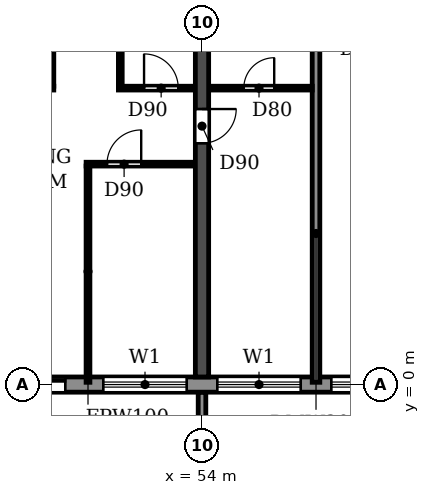
"""IFC4 building model, lengths in metres.
Left out: names, types, materials, properties, quantities, classifications, styles, units other than length and angle.
Written with IfcOpenShell. Run it as: python <this file> out.ifc"""

import sys

from ifc_helpers import new_model, si_unit, direction, frame, frame_2d, origin, place, context, subcontext, project, spatial, polyline, rectangle, outline, extrude, source, transform, mapped, element, fill, save


model = new_model("IFC4")
c1 = context("Model", 3, precision=1e-05, world=origin(), true_north=direction((0.0, 1.0)))
c2 = subcontext(c1, "Body", "Model", "MODEL_VIEW")
j1 = project(units=[si_unit("LENGTHUNIT", "METRE"), si_unit("PLANEANGLEUNIT", "RADIAN")], contexts=[c1])
p1 = place(None, origin())
s1 = spatial("IfcSite", under=j1, at=p1, CompositionType="ELEMENT")
p2 = place(p1, origin())
s2 = spatial("IfcBuilding", under=s1, at=p2, CompositionType="ELEMENT")
p3 = place(p2, frame((0.0, 0.0, 92.7)))
s3 = spatial("IfcBuildingStorey", under=s2, at=p3, CompositionType="ELEMENT", Elevation=92.7)
p4 = place(p3, frame((54.0, 0.2, 0.0), z_axis=(0.0, 0.0, 1.0), x_axis=(0.0, 1.0, 0.0)))
e1 = element("IfcWall", 1, at=p4, inside=s3, PredefinedType="SHEAR", context=c2, shape_type="SweptSolid", body=[
    extrude(rectangle(XDim=11.675, YDim=0.35, at=frame_2d((5.837, 0.0))), origin(), (0.0, 0.0, 1.0), 3.06),
])
p5 = place(p4, frame((6.15, 0.0, 0.0)))
e2 = element("IfcOpeningElement", 2, at=p5, cuts=e1, PredefinedType="OPENING", context=c2, shape_type="SweptSolid", body=[
    extrude(rectangle(XDim=0.9, YDim=2.1, at=frame_2d((0.45, 1.05))), frame((0.0, 0.185, 0.0), z_axis=(0.0, -1.0, 0.0), x_axis=(1.0, 0.0, 0.0)), (0.0, 0.0, 1.0), 0.37),
])
p6 = place(p3, frame((10.683, 0.0, 0.0), z_axis=(0.0, 0.0, 1.0), x_axis=(1.0, 0.0, 0.0)))
e3 = element("IfcWall", 3, at=p6, inside=s3, PredefinedType="STANDARD", context=c2, shape_type="SweptSolid", body=[
    extrude(rectangle(XDim=80.634, YDim=0.4, at=frame_2d((40.317, 0.0))), origin(), (0.0, 0.0, 1.0), 3.06),
])
p7 = place(p6, frame((1.717, 0.0, 0.9)))
e4 = element("IfcOpeningElement", 4, at=p7, cuts=e3, PredefinedType="OPENING", context=c2, shape_type="SweptSolid", body=[
    extrude(rectangle(XDim=2.2, YDim=1.5, at=frame_2d((1.1, 0.75))), frame((0.0, 0.21, 0.0), z_axis=(0.0, -1.0, 0.0), x_axis=(1.0, 0.0, 0.0)), (0.0, 0.0, 1.0), 0.42),
])
p8 = place(p6, frame((4.917, 0.0, 0.0)))
e5 = element("IfcOpeningElement", 5, at=p8, cuts=e3, PredefinedType="OPENING", context=c2, shape_type="SweptSolid", body=[
    extrude(rectangle(XDim=1.8, YDim=2.4, at=frame_2d((0.9, 1.2))), frame((0.0, 0.21, 0.0), z_axis=(0.0, -1.0, 0.0), x_axis=(1.0, 0.0, 0.0)), (0.0, 0.0, 1.0), 0.42),
])
p9 = place(p6, frame((7.717, 0.0, 0.9)))
e6 = element("IfcOpeningElement", 6, at=p9, cuts=e3, PredefinedType="OPENING", context=c2, shape_type="SweptSolid", body=[
    extrude(rectangle(XDim=2.2, YDim=1.5, at=frame_2d((1.1, 0.75))), frame((0.0, 0.21, 0.0), z_axis=(0.0, -1.0, 0.0), x_axis=(1.0, 0.0, 0.0)), (0.0, 0.0, 1.0), 0.42),
])
p10 = place(p6, frame((10.717, 0.0, 0.9)))
e7 = element("IfcOpeningElement", 7, at=p10, cuts=e3, PredefinedType="OPENING", context=c2, shape_type="SweptSolid", body=[
    extrude(rectangle(XDim=2.2, YDim=1.5, at=frame_2d((1.1, 0.75))), frame((0.0, 0.21, 0.0), z_axis=(0.0, -1.0, 0.0), x_axis=(1.0, 0.0, 0.0)), (0.0, 0.0, 1.0), 0.42),
])
p11 = place(p6, frame((13.717, 0.0, 0.9)))
e8 = element("IfcOpeningElement", 8, at=p11, cuts=e3, PredefinedType="OPENING", context=c2, shape_type="SweptSolid", body=[
    extrude(rectangle(XDim=2.2, YDim=1.5, at=frame_2d((1.1, 0.75))), frame((0.0, 0.21, 0.0), z_axis=(0.0, -1.0, 0.0), x_axis=(1.0, 0.0, 0.0)), (0.0, 0.0, 1.0), 0.42),
])
p12 = place(p6, frame((16.717, 0.0, 0.9)))
e9 = element("IfcOpeningElement", 9, at=p12, cuts=e3, PredefinedType="OPENING", context=c2, shape_type="SweptSolid", body=[
    extrude(rectangle(XDim=2.2, YDim=1.5, at=frame_2d((1.1, 0.75))), frame((0.0, 0.21, 0.0), z_axis=(0.0, -1.0, 0.0), x_axis=(1.0, 0.0, 0.0)), (0.0, 0.0, 1.0), 0.42),
])
p13 = place(p6, frame((19.717, 0.0, 0.9)))
e10 = element("IfcOpeningElement", 10, at=p13, cuts=e3, PredefinedType="OPENING", context=c2, shape_type="SweptSolid", body=[
    extrude(rectangle(XDim=2.2, YDim=1.5, at=frame_2d((1.1, 0.75))), frame((0.0, 0.21, 0.0), z_axis=(0.0, -1.0, 0.0), x_axis=(1.0, 0.0, 0.0)), (0.0, 0.0, 1.0), 0.42),
])
p14 = place(p6, frame((22.717, 0.0, 0.9)))
e11 = element("IfcOpeningElement", 11, at=p14, cuts=e3, PredefinedType="OPENING", context=c2, shape_type="SweptSolid", body=[
    extrude(rectangle(XDim=2.2, YDim=1.5, at=frame_2d((1.1, 0.75))), frame((0.0, 0.21, 0.0), z_axis=(0.0, -1.0, 0.0), x_axis=(1.0, 0.0, 0.0)), (0.0, 0.0, 1.0), 0.42),
])
p15 = place(p6, frame((25.717, 0.0, 0.9)))
e12 = element("IfcOpeningElement", 12, at=p15, cuts=e3, PredefinedType="OPENING", context=c2, shape_type="SweptSolid", body=[
    extrude(rectangle(XDim=2.2, YDim=1.5, at=frame_2d((1.1, 0.75))), frame((0.0, 0.21, 0.0), z_axis=(0.0, -1.0, 0.0), x_axis=(1.0, 0.0, 0.0)), (0.0, 0.0, 1.0), 0.42),
])
p16 = place(p6, frame((28.917, 0.0, 0.0)))
e13 = element("IfcOpeningElement", 13, at=p16, cuts=e3, PredefinedType="OPENING", context=c2, shape_type="SweptSolid", body=[
    extrude(rectangle(XDim=1.8, YDim=2.4, at=frame_2d((0.9, 1.2))), frame((0.0, 0.21, 0.0), z_axis=(0.0, -1.0, 0.0), x_axis=(1.0, 0.0, 0.0)), (0.0, 0.0, 1.0), 0.42),
])
p17 = place(p6, frame((31.717, 0.0, 0.9)))
e14 = element("IfcOpeningElement", 14, at=p17, cuts=e3, PredefinedType="OPENING", context=c2, shape_type="SweptSolid", body=[
    extrude(rectangle(XDim=2.2, YDim=1.5, at=frame_2d((1.1, 0.75))), frame((0.0, 0.21, 0.0), z_axis=(0.0, -1.0, 0.0), x_axis=(1.0, 0.0, 0.0)), (0.0, 0.0, 1.0), 0.42),
])
p18 = place(p6, frame((34.717, 0.0, 0.9)))
e15 = element("IfcOpeningElement", 15, at=p18, cuts=e3, PredefinedType="OPENING", context=c2, shape_type="SweptSolid", body=[
    extrude(rectangle(XDim=2.2, YDim=1.5, at=frame_2d((1.1, 0.75))), frame((0.0, 0.21, 0.0), z_axis=(0.0, -1.0, 0.0), x_axis=(1.0, 0.0, 0.0)), (0.0, 0.0, 1.0), 0.42),
])
p19 = place(p6, frame((37.917, 0.0, 0.0)))
e16 = element("IfcOpeningElement", 16, at=p19, cuts=e3, PredefinedType="OPENING", context=c2, shape_type="SweptSolid", body=[
    extrude(rectangle(XDim=1.8, YDim=2.4, at=frame_2d((0.9, 1.2))), frame((0.0, 0.21, 0.0), z_axis=(0.0, -1.0, 0.0), x_axis=(1.0, 0.0, 0.0)), (0.0, 0.0, 1.0), 0.42),
])
p20 = place(p6, frame((40.717, 0.0, 0.9)))
e17 = element("IfcOpeningElement", 17, at=p20, cuts=e3, PredefinedType="OPENING", context=c2, shape_type="SweptSolid", body=[
    extrude(rectangle(XDim=2.2, YDim=1.5, at=frame_2d((1.1, 0.75))), frame((0.0, 0.21, 0.0), z_axis=(0.0, -1.0, 0.0), x_axis=(1.0, 0.0, 0.0)), (0.0, 0.0, 1.0), 0.42),
])
p21 = place(p6, frame((43.717, 0.0, 0.9)))
e18 = element("IfcOpeningElement", 18, at=p21, cuts=e3, PredefinedType="OPENING", context=c2, shape_type="SweptSolid", body=[
    extrude(rectangle(XDim=2.2, YDim=1.5, at=frame_2d((1.1, 0.75))), frame((0.0, 0.21, 0.0), z_axis=(0.0, -1.0, 0.0), x_axis=(1.0, 0.0, 0.0)), (0.0, 0.0, 1.0), 0.42),
])
p22 = place(p6, frame((46.717, 0.0, 0.9)))
e19 = element("IfcOpeningElement", 19, at=p22, cuts=e3, PredefinedType="OPENING", context=c2, shape_type="SweptSolid", body=[
    extrude(rectangle(XDim=2.2, YDim=1.5, at=frame_2d((1.1, 0.75))), frame((0.0, 0.21, 0.0), z_axis=(0.0, -1.0, 0.0), x_axis=(1.0, 0.0, 0.0)), (0.0, 0.0, 1.0), 0.42),
])
p23 = place(p6, frame((49.717, 0.0, 0.9)))
e20 = element("IfcOpeningElement", 20, at=p23, cuts=e3, PredefinedType="OPENING", context=c2, shape_type="SweptSolid", body=[
    extrude(rectangle(XDim=2.2, YDim=1.5, at=frame_2d((1.1, 0.75))), frame((0.0, 0.21, 0.0), z_axis=(0.0, -1.0, 0.0), x_axis=(1.0, 0.0, 0.0)), (0.0, 0.0, 1.0), 0.42),
])
p24 = place(p6, frame((52.917, 0.0, 0.0)))
e21 = element("IfcOpeningElement", 21, at=p24, cuts=e3, PredefinedType="OPENING", context=c2, shape_type="SweptSolid", body=[
    extrude(rectangle(XDim=1.8, YDim=2.4, at=frame_2d((0.9, 1.2))), frame((0.0, 0.21, 0.0), z_axis=(0.0, -1.0, 0.0), x_axis=(1.0, 0.0, 0.0)), (0.0, 0.0, 1.0), 0.42),
])
p25 = place(p6, frame((55.717, 0.0, 0.9)))
e22 = element("IfcOpeningElement", 22, at=p25, cuts=e3, PredefinedType="OPENING", context=c2, shape_type="SweptSolid", body=[
    extrude(rectangle(XDim=2.2, YDim=1.5, at=frame_2d((1.1, 0.75))), frame((0.0, 0.21, 0.0), z_axis=(0.0, -1.0, 0.0), x_axis=(1.0, 0.0, 0.0)), (0.0, 0.0, 1.0), 0.42),
])
p26 = place(p6, frame((58.717, 0.0, 0.9)))
e23 = element("IfcOpeningElement", 23, at=p26, cuts=e3, PredefinedType="OPENING", context=c2, shape_type="SweptSolid", body=[
    extrude(rectangle(XDim=2.2, YDim=1.5, at=frame_2d((1.1, 0.75))), frame((0.0, 0.21, 0.0), z_axis=(0.0, -1.0, 0.0), x_axis=(1.0, 0.0, 0.0)), (0.0, 0.0, 1.0), 0.42),
])
p27 = place(p6, frame((61.717, 0.0, 0.9)))
e24 = element("IfcOpeningElement", 24, at=p27, cuts=e3, PredefinedType="OPENING", context=c2, shape_type="SweptSolid", body=[
    extrude(rectangle(XDim=2.2, YDim=1.5, at=frame_2d((1.1, 0.75))), frame((0.0, 0.21, 0.0), z_axis=(0.0, -1.0, 0.0), x_axis=(1.0, 0.0, 0.0)), (0.0, 0.0, 1.0), 0.42),
])
p28 = place(p6, frame((64.917, 0.0, 0.0)))
e25 = element("IfcOpeningElement", 25, at=p28, cuts=e3, PredefinedType="OPENING", context=c2, shape_type="SweptSolid", body=[
    extrude(rectangle(XDim=1.8, YDim=2.4, at=frame_2d((0.9, 1.2))), frame((0.0, 0.21, 0.0), z_axis=(0.0, -1.0, 0.0), x_axis=(1.0, 0.0, 0.0)), (0.0, 0.0, 1.0), 0.42),
])
p29 = place(p6, frame((67.717, 0.0, 0.9)))
e26 = element("IfcOpeningElement", 26, at=p29, cuts=e3, PredefinedType="OPENING", context=c2, shape_type="SweptSolid", body=[
    extrude(rectangle(XDim=2.2, YDim=1.5, at=frame_2d((1.1, 0.75))), frame((0.0, 0.21, 0.0), z_axis=(0.0, -1.0, 0.0), x_axis=(1.0, 0.0, 0.0)), (0.0, 0.0, 1.0), 0.42),
])
p30 = place(p6, frame((70.717, 0.0, 0.9)))
e27 = element("IfcOpeningElement", 27, at=p30, cuts=e3, PredefinedType="OPENING", context=c2, shape_type="SweptSolid", body=[
    extrude(rectangle(XDim=2.2, YDim=1.5, at=frame_2d((1.1, 0.75))), frame((0.0, 0.21, 0.0), z_axis=(0.0, -1.0, 0.0), x_axis=(1.0, 0.0, 0.0)), (0.0, 0.0, 1.0), 0.42),
])
p31 = place(p6, frame((73.917, 0.0, 0.0)))
e28 = element("IfcOpeningElement", 28, at=p31, cuts=e3, PredefinedType="OPENING", context=c2, shape_type="SweptSolid", body=[
    extrude(rectangle(XDim=1.8, YDim=2.4, at=frame_2d((0.9, 1.2))), frame((0.0, 0.21, 0.0), z_axis=(0.0, -1.0, 0.0), x_axis=(1.0, 0.0, 0.0)), (0.0, 0.0, 1.0), 0.42),
])
p32 = place(p6, frame((76.717, 0.0, 0.9)))
e29 = element("IfcOpeningElement", 29, at=p32, cuts=e3, PredefinedType="OPENING", context=c2, shape_type="SweptSolid", body=[
    extrude(rectangle(XDim=2.2, YDim=1.5, at=frame_2d((1.1, 0.75))), frame((0.0, 0.21, 0.0), z_axis=(0.0, -1.0, 0.0), x_axis=(1.0, 0.0, 0.0)), (0.0, 0.0, 1.0), 0.42),
])
m1 = source(origin(), c2, "Body", "SweptSolid", [
    extrude(outline(polyline([(0.0, 0.0), (0.2, 0.0), (0.2, 1.65), (0.0, 1.65), (0.0, 0.0)])), origin(), (0.0, 0.0, 1.0), 3.1),
])
p33 = place(p3, frame((53.9, -1.85, 0.0)))
e30 = element("IfcWall", 30, at=p33, inside=s3, PredefinedType="STANDARD", context=c2, shape_type="MappedRepresentation", body=[
    mapped(m1, transform((0.0, 0.0, 0.0))),
])
p34 = place(p3, frame((57.0, 0.06, 0.0), z_axis=(0.0, 0.0, 1.0), x_axis=(0.0, 1.0, 0.0)))
e31 = element("IfcWall", 31, at=p34, inside=s3, PredefinedType="PARTITIONING", context=c2, shape_type="SweptSolid", body=[
    extrude(rectangle(XDim=11.805, YDim=0.2, at=frame_2d((5.902, 0.0))), origin(), (0.0, 0.0, 1.0), 3.06),
])
p35 = place(p3, frame((50.95, 5.8, 0.0), z_axis=(0.0, 0.0, 1.0), x_axis=(1.0, 0.0, 0.0)))
e32 = element("IfcWall", 32, at=p35, inside=s3, PredefinedType="PARTITIONING", context=c2, shape_type="SweptSolid", body=[
    extrude(rectangle(XDim=2.865, YDim=0.1, at=frame_2d((1.433, 0.0))), origin(), (0.0, 0.0, 1.0), 3.06),
])
p36 = place(p35, frame((0.55, 0.0, 0.0)))
e33 = element("IfcOpeningElement", 33, at=p36, cuts=e32, PredefinedType="OPENING", context=c2, shape_type="SweptSolid", body=[
    extrude(rectangle(XDim=0.9, YDim=2.1, at=frame_2d((0.45, 1.05))), frame((0.0, 0.06, 0.0), z_axis=(0.0, -1.0, 0.0), x_axis=(1.0, 0.0, 0.0)), (0.0, 0.0, 1.0), 0.12),
])
p37 = place(p3, frame((48.185, 7.8, 0.0), z_axis=(0.0, 0.0, 1.0), x_axis=(1.0, 0.0, 0.0)))
e34 = element("IfcWall", 34, at=p37, inside=s3, PredefinedType="PARTITIONING", context=c2, shape_type="SweptSolid", body=[
    extrude(rectangle(XDim=1.915, YDim=0.1, at=frame_2d((0.958, 0.0))), origin(), (0.0, 0.0, 1.0), 3.06),
])
p38 = place(p37, frame((0.44, 0.0, 0.0)))
e35 = element("IfcOpeningElement", 35, at=p38, cuts=e34, PredefinedType="OPENING", context=c2, shape_type="SweptSolid", body=[
    extrude(rectangle(XDim=0.8, YDim=2.1, at=frame_2d((0.4, 1.05))), frame((0.0, 0.06, 0.0), z_axis=(0.0, -1.0, 0.0), x_axis=(1.0, 0.0, 0.0)), (0.0, 0.0, 1.0), 0.12),
])
p39 = place(p3, frame((51.8, 7.8, 0.0), z_axis=(0.0, 0.0, 1.0), x_axis=(1.0, 0.0, 0.0)))
e36 = element("IfcWall", 36, at=p39, inside=s3, PredefinedType="PARTITIONING", context=c2, shape_type="SweptSolid", body=[
    extrude(rectangle(XDim=2.015, YDim=0.1, at=frame_2d((1.007, 0.0))), origin(), (0.0, 0.0, 1.0), 3.06),
])
p40 = place(p39, frame((0.675, 0.0, 0.0)))
e37 = element("IfcOpeningElement", 37, at=p40, cuts=e36, PredefinedType="OPENING", context=c2, shape_type="SweptSolid", body=[
    extrude(rectangle(XDim=0.9, YDim=2.1, at=frame_2d((0.45, 1.05))), frame((0.0, 0.06, 0.0), z_axis=(0.0, -1.0, 0.0), x_axis=(1.0, 0.0, 0.0)), (0.0, 0.0, 1.0), 0.12),
])
p41 = place(p3, frame((54.185, 7.8, 0.0), z_axis=(0.0, 0.0, 1.0), x_axis=(1.0, 0.0, 0.0)))
e38 = element("IfcWall", 38, at=p41, inside=s3, PredefinedType="PARTITIONING", context=c2, shape_type="SweptSolid", body=[
    extrude(rectangle(XDim=2.715, YDim=0.1, at=frame_2d((1.357, 0.0))), origin(), (0.0, 0.0, 1.0), 3.06),
])
p42 = place(p41, frame((0.915, 0.0, 0.0)))
e39 = element("IfcOpeningElement", 39, at=p42, cuts=e38, PredefinedType="OPENING", context=c2, shape_type="SweptSolid", body=[
    extrude(rectangle(XDim=0.8, YDim=2.1, at=frame_2d((0.4, 1.05))), frame((0.0, 0.06, 0.0), z_axis=(0.0, -1.0, 0.0), x_axis=(1.0, 0.0, 0.0)), (0.0, 0.0, 1.0), 0.12),
])
p43 = place(p3, frame((50.05, 7.85, 0.0), z_axis=(0.0, 0.0, 1.0), x_axis=(0.0, 1.0, 0.0)))
e40 = element("IfcWall", 40, at=p43, inside=s3, PredefinedType="PARTITIONING", context=c2, shape_type="SweptSolid", body=[
    extrude(rectangle(XDim=4.015, YDim=0.1, at=frame_2d((2.007, 0.0))), origin(), (0.0, 0.0, 1.0), 3.06),
])
p44 = place(p3, frame((51.0, 0.06, 0.0), z_axis=(0.0, 0.0, 1.0), x_axis=(0.0, 1.0, 0.0)))
e41 = element("IfcWall", 41, at=p44, inside=s3, PredefinedType="PARTITIONING", context=c2, shape_type="SweptSolid", body=[
    extrude(rectangle(XDim=5.69, YDim=0.1, at=frame_2d((2.845, 0.0))), origin(), (0.0, 0.0, 1.0), 3.06),
])
p45 = place(p3, frame((51.85, 7.85, 0.0), z_axis=(0.0, 0.0, 1.0), x_axis=(0.0, 1.0, 0.0)))
e42 = element("IfcWall", 42, at=p45, inside=s3, PredefinedType="PARTITIONING", context=c2, shape_type="SweptSolid", body=[
    extrude(rectangle(XDim=4.015, YDim=0.1, at=frame_2d((2.007, 0.0))), origin(), (0.0, 0.0, 1.0), 3.06),
])
p46 = place(p19, origin())
e43 = element("IfcDoor", 43, at=p46, inside=s3, OperationType="DOUBLE_DOOR_SLIDING", PredefinedType="DOOR", context=c2, shape_type="SweptSolid", body=[
    extrude(rectangle(XDim=1.8, YDim=2.4, at=frame_2d((0.9, 1.2))), frame((0.0, 0.025, 0.0), z_axis=(0.0, -1.0, 0.0), x_axis=(1.0, 0.0, 0.0)), (0.0, 0.0, 1.0), 0.05),
])
fill(e16, e43)
p47 = place(p20, origin())
e44 = element("IfcWindow", 44, at=p47, inside=s3, PartitioningType="DOUBLE_PANEL_HORIZONTAL", PredefinedType="WINDOW", context=c2, shape_type="SweptSolid", body=[
    extrude(rectangle(XDim=2.2, YDim=1.5, at=frame_2d((1.1, 0.75))), frame((0.0, 0.03, 0.0), z_axis=(0.0, -1.0, 0.0), x_axis=(1.0, 0.0, 0.0)), (0.0, 0.0, 1.0), 0.06),
])
fill(e17, e44)
p48 = place(p21, origin())
e45 = element("IfcWindow", 45, at=p48, inside=s3, PartitioningType="DOUBLE_PANEL_HORIZONTAL", PredefinedType="WINDOW", context=c2, shape_type="SweptSolid", body=[
    extrude(rectangle(XDim=2.2, YDim=1.5, at=frame_2d((1.1, 0.75))), frame((0.0, 0.03, 0.0), z_axis=(0.0, -1.0, 0.0), x_axis=(1.0, 0.0, 0.0)), (0.0, 0.0, 1.0), 0.06),
])
fill(e18, e45)
p49 = place(p22, origin())
e46 = element("IfcWindow", 46, at=p49, inside=s3, PartitioningType="DOUBLE_PANEL_HORIZONTAL", PredefinedType="WINDOW", context=c2, shape_type="SweptSolid", body=[
    extrude(rectangle(XDim=2.2, YDim=1.5, at=frame_2d((1.1, 0.75))), frame((0.0, 0.03, 0.0), z_axis=(0.0, -1.0, 0.0), x_axis=(1.0, 0.0, 0.0)), (0.0, 0.0, 1.0), 0.06),
])
fill(e19, e46)
p50 = place(p42, origin())
e47 = element("IfcDoor", 47, at=p50, inside=s3, OperationType="SINGLE_SWING_RIGHT", PredefinedType="DOOR", context=c2, shape_type="SweptSolid", body=[
    extrude(rectangle(XDim=0.8, YDim=2.1, at=frame_2d((0.4, 1.05))), frame((0.0, 0.025, 0.0), z_axis=(0.0, -1.0, 0.0), x_axis=(1.0, 0.0, 0.0)), (0.0, 0.0, 1.0), 0.05),
])
fill(e39, e47)
p51 = place(p36, origin())
e48 = element("IfcDoor", 48, at=p51, inside=s3, OperationType="SINGLE_SWING_RIGHT", PredefinedType="DOOR", context=c2, shape_type="SweptSolid", body=[
    extrude(rectangle(XDim=0.9, YDim=2.1, at=frame_2d((0.45, 1.05))), frame((0.0, 0.025, 0.0), z_axis=(0.0, -1.0, 0.0), x_axis=(1.0, 0.0, 0.0)), (0.0, 0.0, 1.0), 0.05),
])
fill(e33, e48)
p52 = place(p40, origin())
e49 = element("IfcDoor", 49, at=p52, inside=s3, OperationType="SINGLE_SWING_LEFT", PredefinedType="DOOR", context=c2, shape_type="SweptSolid", body=[
    extrude(rectangle(XDim=0.9, YDim=2.1, at=frame_2d((0.45, 1.05))), frame((0.0, 0.025, 0.0), z_axis=(0.0, -1.0, 0.0), x_axis=(1.0, 0.0, 0.0)), (0.0, 0.0, 1.0), 0.05),
])
fill(e37, e49)
p53 = place(p5, frame((0.9, 0.0, 0.0), z_axis=(0.0, 0.0, 1.0), x_axis=(-1.0, 0.0, 0.0)))
e50 = element("IfcDoor", 50, at=p53, inside=s3, OperationType="SINGLE_SWING_LEFT", PredefinedType="DOOR", context=c2, shape_type="SweptSolid", body=[
    extrude(rectangle(XDim=0.9, YDim=2.1, at=frame_2d((0.45, 1.05))), frame((0.0, 0.025, 0.0), z_axis=(0.0, -1.0, 0.0), x_axis=(1.0, 0.0, 0.0)), (0.0, 0.0, 1.0), 0.05),
])
fill(e2, e50)
save(model, sys.argv[1])
